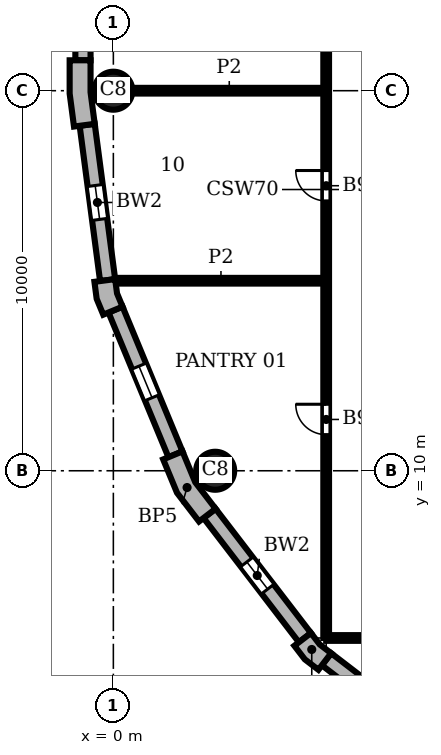
"""IFC4 building model, lengths in metres.
Left out: names, types, materials, properties, quantities, classifications, styles, units other than length and angle.
Written with IfcOpenShell. Run it as: python <this file> out.ifc"""

import sys

from ifc_helpers import new_model, si_unit, direction, frame, frame_2d, origin, origin_2d, place, context, subcontext, project, spatial, polyline, rectangle, circle, outline, extrude, element, fill, save


model = new_model("IFC4")
c1 = context("Model", 3, precision=1e-05, world=origin(), true_north=direction((0.0, 1.0)))
c2 = subcontext(c1, "Body", "Model", "MODEL_VIEW")
j1 = project(units=[si_unit("LENGTHUNIT", "METRE"), si_unit("PLANEANGLEUNIT", "RADIAN")], contexts=[c1])
p1 = place(None, origin())
s1 = spatial("IfcSite", under=j1, at=p1, CompositionType="ELEMENT")
p2 = place(p1, origin())
s2 = spatial("IfcBuilding", under=s1, at=p2, CompositionType="ELEMENT")
p3 = place(p2, frame((0.0, 0.0, 233.1)))
s3 = spatial("IfcBuildingStorey", under=s2, at=p3, CompositionType="ELEMENT", Elevation=233.1)
for number, where, z_axis, x_axis in (
    (1, (0.0, 20.0, 0.0), (0.0, 0.0, 1.0), (1.0, 0.0, 0.0)),
    (2, (2.679, 10.0, 0.0), (0.0, 0.0, 1.0), (1.0, 0.0, 0.0)),
):
    element("IfcColumn", number, at=place(p3, frame(where, z_axis=z_axis, x_axis=x_axis)), inside=s3, PredefinedType="COLUMN", context=c2, shape_type="SweptSolid", body=[
        extrude(circle(Radius=0.5, at=origin_2d()), origin(), (0.0, 0.0, 1.0), 3.9),
    ])
p4 = place(p3, origin())
e3 = element("IfcWall", 3, at=p4, inside=s3, PredefinedType="SOLIDWALL", context=c2, shape_type="SweptSolid", body=[
    extrude(outline(polyline([(-1.0, 20.8), (-1.15, 20.8), (-1.15, 19.925), (-1.036, 19.057), (-0.887, 19.076), (-0.49, 19.128), (-0.6, 19.961), (-0.6, 20.8), (-1.0, 20.8)])), origin(), (0.0, 0.0, 1.0), 3.9),
])
e4 = element("IfcWall", 4, at=p4, inside=s3, PredefinedType="SOLIDWALL", context=c2, shape_type="SweptSolid", body=[
    extrude(outline(polyline([(-0.349, 14.99), (-0.498, 14.971), (-0.439, 14.523), (-0.266, 14.106), (-0.128, 14.164), (0.242, 14.317), (0.097, 14.667), (0.047, 15.043), (-0.349, 14.99)])), origin(), (0.0, 0.0, 1.0), 3.9),
])
e5 = element("IfcWall", 5, at=p4, inside=s3, PredefinedType="SOLIDWALL", context=c2, shape_type="SweptSolid", body=[
    extrude(outline(polyline([(1.449, 10.356), (1.311, 10.299), (1.675, 9.42), (2.254, 8.665), (2.373, 8.757), (2.69, 9.0), (2.155, 9.698), (1.819, 10.51), (1.449, 10.356)])), origin(), (0.0, 0.0, 1.0), 3.9),
])
e6 = element("IfcWall", 6, at=p4, inside=s3, PredefinedType="SOLIDWALL", context=c2, shape_type="SweptSolid", body=[
    extrude(outline(polyline([(4.882, 5.487), (4.763, 5.396), (5.038, 5.038), (5.396, 4.763), (5.487, 4.882), (5.731, 5.199), (5.43, 5.43), (5.199, 5.731), (4.882, 5.487)])), origin(), (0.0, 0.0, 1.0), 3.9),
])
p5 = place(p3, frame((-0.8, 39.2, 0.0), z_axis=(0.0, 0.0, 1.0), x_axis=(0.0, -1.0, 0.0)))
e7 = element("IfcWall", 7, at=p5, inside=s3, PredefinedType="SOLIDWALL", context=c2, shape_type="SweptSolid", body=[
    extrude(rectangle(XDim=18.4, YDim=0.4, at=frame_2d((9.2, 0.0))), origin(), (0.0, 0.0, 1.0), 3.9),
])
p6 = place(p5, frame((3.75, 0.0, 0.9)))
e8 = element("IfcOpeningElement", 8, at=p6, cuts=e7, PredefinedType="OPENING", context=c2, shape_type="SweptSolid", body=[
    extrude(rectangle(XDim=0.9, YDim=2.35, at=frame_2d((0.45, 1.175))), frame((0.0, 0.21, 0.0), z_axis=(0.0, -1.0, 0.0), x_axis=(1.0, 0.0, 0.0)), (0.0, 0.0, 1.0), 0.42),
])
p7 = place(p5, frame((13.75, 0.0, 0.9)))
e9 = element("IfcOpeningElement", 9, at=p7, cuts=e7, PredefinedType="OPENING", context=c2, shape_type="SweptSolid", body=[
    extrude(rectangle(XDim=0.9, YDim=2.35, at=frame_2d((0.45, 1.175))), frame((0.0, 0.21, 0.0), z_axis=(0.0, -1.0, 0.0), x_axis=(1.0, 0.0, 0.0)), (0.0, 0.0, 1.0), 0.42),
])
p8 = place(p3, frame((-0.689, 19.102, 0.0), z_axis=(0.0, 0.0, 1.0), x_axis=(0.130514280502, -0.991446429508, 0.0)))
e10 = element("IfcWall", 10, at=p8, inside=s3, PredefinedType="SOLIDWALL", context=c2, shape_type="SweptSolid", body=[
    extrude(rectangle(XDim=4.121, YDim=0.4, at=frame_2d((2.061, 0.0))), origin(), (0.0, 0.0, 1.0), 3.9),
])
p9 = place(p8, frame((1.611, 0.0, 0.9)))
e11 = element("IfcOpeningElement", 11, at=p9, cuts=e10, PredefinedType="OPENING", context=c2, shape_type="SweptSolid", body=[
    extrude(rectangle(XDim=0.9, YDim=2.35, at=frame_2d((0.45, 1.175))), frame((0.0, 0.21, 0.0), z_axis=(0.0, -1.0, 0.0), x_axis=(1.0, 0.0, 0.0)), (0.0, 0.0, 1.0), 0.42),
])
p10 = place(p3, frame((0.057, 14.24, 0.0), z_axis=(0.0, 0.0, 1.0), x_axis=(0.382721546029, -0.923863744394, 0.0)))
e12 = element("IfcWall", 12, at=p10, inside=s3, PredefinedType="SOLIDWALL", context=c2, shape_type="SweptSolid", body=[
    extrude(rectangle(XDim=4.121, YDim=0.4, at=frame_2d((2.061, 0.0))), origin(), (0.0, 0.0, 1.0), 3.9),
])
p11 = place(p10, frame((1.611, 0.0, 0.9)))
e13 = element("IfcOpeningElement", 13, at=p11, cuts=e12, PredefinedType="OPENING", context=c2, shape_type="SweptSolid", body=[
    extrude(rectangle(XDim=0.9, YDim=2.35, at=frame_2d((0.45, 1.175))), frame((0.0, 0.21, 0.0), z_axis=(0.0, -1.0, 0.0), x_axis=(1.0, 0.0, 0.0)), (0.0, 0.0, 1.0), 0.42),
])
p12 = place(p3, frame((2.532, 8.878, 0.0), z_axis=(0.0, 0.0, 1.0), x_axis=(0.608759824817, -0.793354571229, 0.0)))
e14 = element("IfcWall", 14, at=p12, inside=s3, PredefinedType="SOLIDWALL", context=c2, shape_type="SweptSolid", body=[
    extrude(rectangle(XDim=4.121, YDim=0.4, at=frame_2d((2.061, 0.0))), origin(), (0.0, 0.0, 1.0), 3.9),
])
p13 = place(p12, frame((1.611, 0.0, 0.9)))
e15 = element("IfcOpeningElement", 15, at=p13, cuts=e14, PredefinedType="OPENING", context=c2, shape_type="SweptSolid", body=[
    extrude(rectangle(XDim=0.9, YDim=2.35, at=frame_2d((0.45, 1.175))), frame((0.0, 0.21, 0.0), z_axis=(0.0, -1.0, 0.0), x_axis=(1.0, 0.0, 0.0)), (0.0, 0.0, 1.0), 0.42),
])
p14 = place(p3, frame((5.609, 5.041, 0.0), z_axis=(0.0, 0.0, 1.0), x_axis=(0.793354571229, -0.608759824817, 0.0)))
e16 = element("IfcWall", 16, at=p14, inside=s3, PredefinedType="SOLIDWALL", context=c2, shape_type="SweptSolid", body=[
    extrude(rectangle(XDim=4.121, YDim=0.4, at=frame_2d((2.061, 0.0))), origin(), (0.0, 0.0, 1.0), 3.9),
])
p15 = place(p14, frame((1.611, 0.0, 0.9)))
e17 = element("IfcOpeningElement", 17, at=p15, cuts=e16, PredefinedType="OPENING", context=c2, shape_type="SweptSolid", body=[
    extrude(rectangle(XDim=0.9, YDim=2.35, at=frame_2d((0.45, 1.175))), frame((0.0, 0.21, 0.0), z_axis=(0.0, -1.0, 0.0), x_axis=(1.0, 0.0, 0.0)), (0.0, 0.0, 1.0), 0.42),
])
p16 = place(p3, frame((5.6, 5.6, 0.0), z_axis=(0.0, 0.0, 1.0), x_axis=(0.0, 1.0, 0.0)))
e18 = element("IfcWall", 18, at=p16, inside=s3, PredefinedType="PARTITIONING", context=c2, shape_type="SweptSolid", body=[
    extrude(rectangle(XDim=22.4, YDim=0.15, at=frame_2d((11.2, 0.0))), origin(), (0.0, 0.0, 1.0), 3.45),
])
p17 = place(p16, frame((5.35, 0.0, 0.0)))
e19 = element("IfcOpeningElement", 19, at=p17, cuts=e18, PredefinedType="OPENING", context=c2, shape_type="SweptSolid", body=[
    extrude(rectangle(XDim=0.8, YDim=2.1, at=frame_2d((0.4, 1.05))), frame((0.0, 0.085, 0.0), z_axis=(0.0, -1.0, 0.0), x_axis=(1.0, 0.0, 0.0)), (0.0, 0.0, 1.0), 0.17),
])
p18 = place(p16, frame((11.5, 0.0, 0.0)))
e20 = element("IfcOpeningElement", 20, at=p18, cuts=e18, PredefinedType="OPENING", context=c2, shape_type="SweptSolid", body=[
    extrude(rectangle(XDim=0.8, YDim=2.1, at=frame_2d((0.4, 1.05))), frame((0.0, 0.085, 0.0), z_axis=(0.0, -1.0, 0.0), x_axis=(1.0, 0.0, 0.0)), (0.0, 0.0, 1.0), 0.17),
])
p19 = place(p16, frame((17.75, 0.0, 0.0)))
e21 = element("IfcOpeningElement", 21, at=p19, cuts=e18, PredefinedType="OPENING", context=c2, shape_type="SweptSolid", body=[
    extrude(rectangle(XDim=1.8, YDim=2.1, at=frame_2d((0.9, 1.05))), frame((0.0, 0.085, 0.0), z_axis=(0.0, -1.0, 0.0), x_axis=(1.0, 0.0, 0.0)), (0.0, 0.0, 1.0), 0.17),
])
p20 = place(p3, frame((5.6, 5.6, 0.0), z_axis=(0.0, 0.0, 1.0), x_axis=(1.0, 0.0, 0.0)))
e22 = element("IfcWall", 22, at=p20, inside=s3, PredefinedType="PARTITIONING", context=c2, shape_type="SweptSolid", body=[
    extrude(rectangle(XDim=25.4, YDim=0.15, at=frame_2d((12.7, 0.0))), origin(), (0.0, 0.0, 1.0), 3.45),
])
p21 = place(p20, frame((20.75, 0.0, 0.0)))
e23 = element("IfcOpeningElement", 23, at=p21, cuts=e22, PredefinedType="OPENING", context=c2, shape_type="SweptSolid", body=[
    extrude(rectangle(XDim=1.0, YDim=2.1, at=frame_2d((0.5, 1.05))), frame((0.0, 0.085, 0.0), z_axis=(0.0, -1.0, 0.0), x_axis=(1.0, 0.0, 0.0)), (0.0, 0.0, 1.0), 0.17),
])
p22 = place(p20, frame((5.35, 0.0, 0.0)))
e24 = element("IfcOpeningElement", 24, at=p22, cuts=e22, PredefinedType="OPENING", context=c2, shape_type="SweptSolid", body=[
    extrude(rectangle(XDim=0.8, YDim=2.1, at=frame_2d((0.4, 1.05))), frame((0.0, 0.085, 0.0), z_axis=(0.0, -1.0, 0.0), x_axis=(1.0, 0.0, 0.0)), (0.0, 0.0, 1.0), 0.17),
])
p23 = place(p20, frame((11.5, 0.0, 0.0)))
e25 = element("IfcOpeningElement", 25, at=p23, cuts=e22, PredefinedType="OPENING", context=c2, shape_type="SweptSolid", body=[
    extrude(rectangle(XDim=0.8, YDim=2.1, at=frame_2d((0.4, 1.05))), frame((0.0, 0.085, 0.0), z_axis=(0.0, -1.0, 0.0), x_axis=(1.0, 0.0, 0.0)), (0.0, 0.0, 1.0), 0.17),
])
p24 = place(p3, frame((0.063, 15.0, 0.0), z_axis=(0.0, 0.0, 1.0), x_axis=(1.0, 0.0, 0.0)))
e26 = element("IfcWall", 26, at=p24, inside=s3, PredefinedType="PARTITIONING", context=c2, shape_type="SweptSolid", body=[
    extrude(rectangle(XDim=5.537, YDim=0.15, at=frame_2d((2.769, 0.0))), origin(), (0.0, 0.0, 1.0), 3.45),
])
p25 = place(p3, frame((0.5, 20.0, 0.0), z_axis=(0.0, 0.0, 1.0), x_axis=(1.0, 0.0, 0.0)))
e27 = element("IfcWall", 27, at=p25, inside=s3, PredefinedType="PARTITIONING", context=c2, shape_type="SweptSolid", body=[
    extrude(rectangle(XDim=5.1, YDim=0.15, at=frame_2d((2.55, 0.0))), origin(), (0.0, 0.0, 1.0), 3.45),
])
p26 = place(p9, origin())
e28 = element("IfcWindow", 28, at=p26, inside=s3, PartitioningType="SINGLE_PANEL", PredefinedType="WINDOW", context=c2, shape_type="SweptSolid", body=[
    extrude(rectangle(XDim=0.9, YDim=2.35, at=frame_2d((0.45, 1.175))), frame((0.0, 0.16, 0.0), z_axis=(0.0, -1.0, 0.0), x_axis=(1.0, 0.0, 0.0)), (0.0, 0.0, 1.0), 0.06),
])
fill(e11, e28)
p27 = place(p11, origin())
e29 = element("IfcWindow", 29, at=p27, inside=s3, PartitioningType="SINGLE_PANEL", PredefinedType="WINDOW", context=c2, shape_type="SweptSolid", body=[
    extrude(rectangle(XDim=0.9, YDim=2.35, at=frame_2d((0.45, 1.175))), frame((0.0, 0.16, 0.0), z_axis=(0.0, -1.0, 0.0), x_axis=(1.0, 0.0, 0.0)), (0.0, 0.0, 1.0), 0.06),
])
fill(e13, e29)
p28 = place(p13, origin())
e30 = element("IfcWindow", 30, at=p28, inside=s3, PartitioningType="SINGLE_PANEL", PredefinedType="WINDOW", context=c2, shape_type="SweptSolid", body=[
    extrude(rectangle(XDim=0.9, YDim=2.35, at=frame_2d((0.45, 1.175))), frame((0.0, 0.16, 0.0), z_axis=(0.0, -1.0, 0.0), x_axis=(1.0, 0.0, 0.0)), (0.0, 0.0, 1.0), 0.06),
])
fill(e15, e30)
p29 = place(p17, origin())
e31 = element("IfcDoor", 31, at=p29, inside=s3, OperationType="SINGLE_SWING_RIGHT", PredefinedType="DOOR", context=c2, shape_type="SweptSolid", body=[
    extrude(rectangle(XDim=0.8, YDim=2.1, at=frame_2d((0.4, 1.05))), frame((0.0, 0.025, 0.0), z_axis=(0.0, -1.0, 0.0), x_axis=(1.0, 0.0, 0.0)), (0.0, 0.0, 1.0), 0.05),
])
fill(e19, e31)
p30 = place(p18, origin())
e32 = element("IfcDoor", 32, at=p30, inside=s3, OperationType="SINGLE_SWING_RIGHT", PredefinedType="DOOR", context=c2, shape_type="SweptSolid", body=[
    extrude(rectangle(XDim=0.8, YDim=2.1, at=frame_2d((0.4, 1.05))), frame((0.0, 0.025, 0.0), z_axis=(0.0, -1.0, 0.0), x_axis=(1.0, 0.0, 0.0)), (0.0, 0.0, 1.0), 0.05),
])
fill(e20, e32)
save(model, sys.argv[1])
